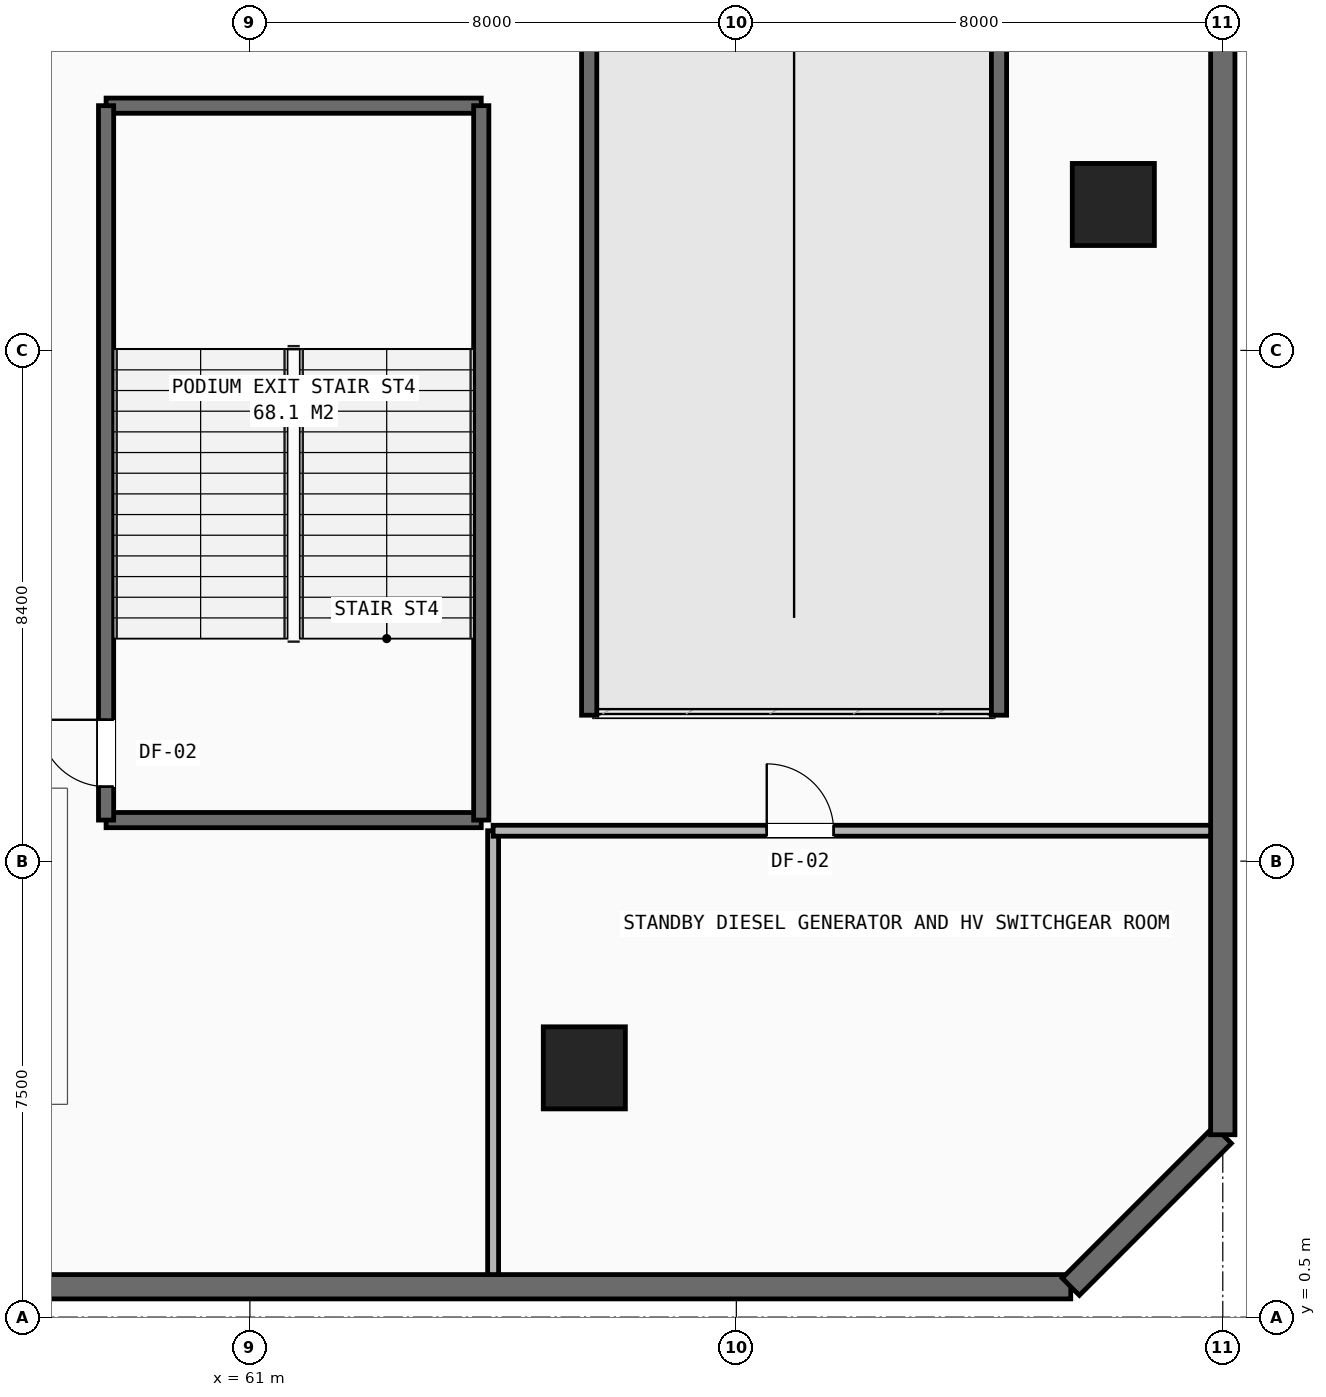
"""IFC4 building model, lengths in metres.
Left out: names, types, materials, properties, quantities, classifications, styles, units other than length and angle.
Written with IfcOpenShell. Run it as: python <this file> out.ifc"""

import sys

from ifc_helpers import new_model, si_unit, direction, frame, frame_2d, origin, origin_2d, place, context, subcontext, project, spatial, rectangle, hollow_rectangle, extrude, element, fill, save


model = new_model("IFC4")
c1 = context("Model", 3, precision=1e-05, world=origin(), true_north=direction((0.0, 1.0)))
c2 = subcontext(c1, "Body", "Model", "MODEL_VIEW")
j1 = project(units=[si_unit("LENGTHUNIT", "METRE"), si_unit("PLANEANGLEUNIT", "RADIAN")], contexts=[c1])
p1 = place(None, origin())
s1 = spatial("IfcSite", under=j1, at=p1, CompositionType="ELEMENT")
p2 = place(p1, origin())
s2 = spatial("IfcBuilding", under=s1, at=p2, CompositionType="ELEMENT")
p3 = place(p2, frame((0.0, 0.0, -10.0)))
s3 = spatial("IfcBuildingStorey", under=s2, at=p3, CompositionType="ELEMENT", Elevation=-10.0)
for number, where, z_axis, x_axis in (
    (1, (66.5, 4.6, 0.0), (0.0, 0.0, 1.0), (1.0, 0.0, 0.0)),
    (2, (75.2, 18.8, 0.0), (0.0, 0.0, 1.0), (1.0, 0.0, 0.0)),
):
    element("IfcColumn", number, at=place(p3, frame(where, z_axis=z_axis, x_axis=x_axis)), inside=s3, PredefinedType="COLUMN", context=c2, shape_type="SweptSolid", body=[
        extrude(hollow_rectangle(XDim=1.35, YDim=1.35, WallThickness=0.085, at=origin_2d()), origin(), (0.0, 0.0, 1.0), 5.0),
    ])
p4 = place(p3, frame((5.5, 1.0, 0.0), z_axis=(0.0, 0.0, 1.0), x_axis=(1.0, 0.0, 0.0)))
e3 = element("IfcWall", 3, at=p4, inside=s3, PredefinedType="USERDEFINED", context=c2, shape_type="SweptSolid", body=[
    extrude(rectangle(XDim=69.0, YDim=0.4, at=frame_2d((34.5, 0.0))), origin(), (0.0, 0.0, 1.0), 4.64),
])
p5 = place(p3, frame((74.5, 1.0, 0.0), z_axis=(0.0, 0.0, 1.0), x_axis=(0.707106781187, 0.707106781187, 0.0)))
e4 = element("IfcWall", 4, at=p5, inside=s3, PredefinedType="USERDEFINED", context=c2, shape_type="SweptSolid", body=[
    extrude(rectangle(XDim=3.536, YDim=0.4, at=frame_2d((1.768, 0.0))), origin(), (0.0, 0.0, 1.0), 4.64),
])
p6 = place(p3, frame((77.0, 3.5, 0.0), z_axis=(0.0, 0.0, 1.0), x_axis=(0.0, 1.0, 0.0)))
e5 = element("IfcWall", 5, at=p6, inside=s3, PredefinedType="USERDEFINED", context=c2, shape_type="SweptSolid", body=[
    extrude(rectangle(XDim=48.0, YDim=0.4, at=frame_2d((24.0, 0.0))), origin(), (0.0, 0.0, 1.0), 4.64),
])
for number, where, z_axis, x_axis in (
    (6, (58.635, 20.425, 0.0), (0.0, 0.0, 1.0), (1.0, 0.0, 0.0)),
    (7, (58.635, 8.675, 0.0), (0.0, 0.0, 1.0), (1.0, 0.0, 0.0)),
):
    element("IfcWall", number, at=place(p3, frame(where, z_axis=z_axis, x_axis=x_axis)), inside=s3, PredefinedType="SHEAR", context=c2, shape_type="SweptSolid", body=[
        extrude(rectangle(XDim=6.17, YDim=0.25, at=frame_2d((3.085, 0.0))), origin(), (0.0, 0.0, 1.0), 4.64),
    ])
p7 = place(p3, frame((58.635, 8.675, 0.0), z_axis=(0.0, 0.0, 1.0), x_axis=(0.0, 1.0, 0.0)))
e8 = element("IfcWall", 8, at=p7, inside=s3, PredefinedType="SHEAR", context=c2, shape_type="SweptSolid", body=[
    extrude(rectangle(XDim=11.75, YDim=0.25, at=frame_2d((5.875, 0.0))), origin(), (0.0, 0.0, 1.0), 4.64),
])
p8 = place(p7, frame((0.55, 0.0, 0.0)))
e9 = element("IfcOpeningElement", 9, at=p8, cuts=e8, PredefinedType="OPENING", context=c2, shape_type="SweptSolid", body=[
    extrude(rectangle(XDim=1.1, YDim=2.15, at=frame_2d((0.55, 1.075))), frame((0.0, 0.135, 0.0), z_axis=(0.0, -1.0, 0.0), x_axis=(1.0, 0.0, 0.0)), (0.0, 0.0, 1.0), 0.27),
])
p9 = place(p3, frame((64.805, 8.675, 0.0), z_axis=(0.0, 0.0, 1.0), x_axis=(0.0, 1.0, 0.0)))
e10 = element("IfcWall", 10, at=p9, inside=s3, PredefinedType="SHEAR", context=c2, shape_type="SweptSolid", body=[
    extrude(rectangle(XDim=11.75, YDim=0.25, at=frame_2d((5.875, 0.0))), origin(), (0.0, 0.0, 1.0), 4.64),
])
for number, where, z_axis, x_axis in (
    (11, (66.58, 10.4, 0.0), (0.0, 0.0, 1.0), (0.0, 1.0, 0.0)),
    (12, (73.32, 10.4, 0.0), (0.0, 0.0, 1.0), (0.0, 1.0, 0.0)),
):
    element("IfcWall", number, at=place(p3, frame(where, z_axis=z_axis, x_axis=x_axis)), inside=s3, PredefinedType="SHEAR", context=c2, shape_type="SweptSolid", body=[
        extrude(rectangle(XDim=40.2, YDim=0.25, at=frame_2d((20.1, 0.0))), origin(), (0.0, 0.0, 1.0), 4.64),
    ])
p10 = place(p3, frame((65.0, 1.2, 0.0), z_axis=(0.0, 0.0, 1.0), x_axis=(0.0, 1.0, 0.0)))
e13 = element("IfcWall", 13, at=p10, inside=s3, PredefinedType="PARTITIONING", context=c2, shape_type="SweptSolid", body=[
    extrude(rectangle(XDim=7.3, YDim=0.18, at=frame_2d((3.65, 0.0))), origin(), (0.0, 0.0, 1.0), 3.851),
])
p11 = place(p3, frame((65.0, 8.5, 0.0), z_axis=(0.0, 0.0, 1.0), x_axis=(1.0, 0.0, 0.0)))
e14 = element("IfcWall", 14, at=p11, inside=s3, PredefinedType="PARTITIONING", context=c2, shape_type="SweptSolid", body=[
    extrude(rectangle(XDim=11.8, YDim=0.18, at=frame_2d((5.9, 0.0))), origin(), (0.0, 0.0, 1.0), 3.851),
])
p12 = place(p11, frame((4.5, 0.0, 0.0)))
e15 = element("IfcOpeningElement", 15, at=p12, cuts=e14, PredefinedType="OPENING", context=c2, shape_type="SweptSolid", body=[
    extrude(rectangle(XDim=1.1, YDim=2.15, at=frame_2d((0.55, 1.075))), frame((0.0, 0.1, 0.0), z_axis=(0.0, -1.0, 0.0), x_axis=(1.0, 0.0, 0.0)), (0.0, 0.0, 1.0), 0.2),
])
p13 = place(p12, origin())
e16 = element("IfcDoor", 16, at=p13, inside=s3, OperationType="SINGLE_SWING_LEFT", PredefinedType="DOOR", context=c2, shape_type="SweptSolid", body=[
    extrude(rectangle(XDim=1.1, YDim=2.15, at=frame_2d((0.55, 1.075))), frame((0.0, 0.025, 0.0), z_axis=(0.0, -1.0, 0.0), x_axis=(1.0, 0.0, 0.0)), (0.0, 0.0, 1.0), 0.05),
])
fill(e15, e16)
p14 = place(p8, origin())
e17 = element("IfcDoor", 17, at=p14, inside=s3, OperationType="SINGLE_SWING_RIGHT", PredefinedType="DOOR", context=c2, shape_type="SweptSolid", body=[
    extrude(rectangle(XDim=1.1, YDim=2.15, at=frame_2d((0.55, 1.075))), frame((0.0, 0.025, 0.0), z_axis=(0.0, -1.0, 0.0), x_axis=(1.0, 0.0, 0.0)), (0.0, 0.0, 1.0), 0.05),
])
fill(e9, e17)
save(model, sys.argv[1])
